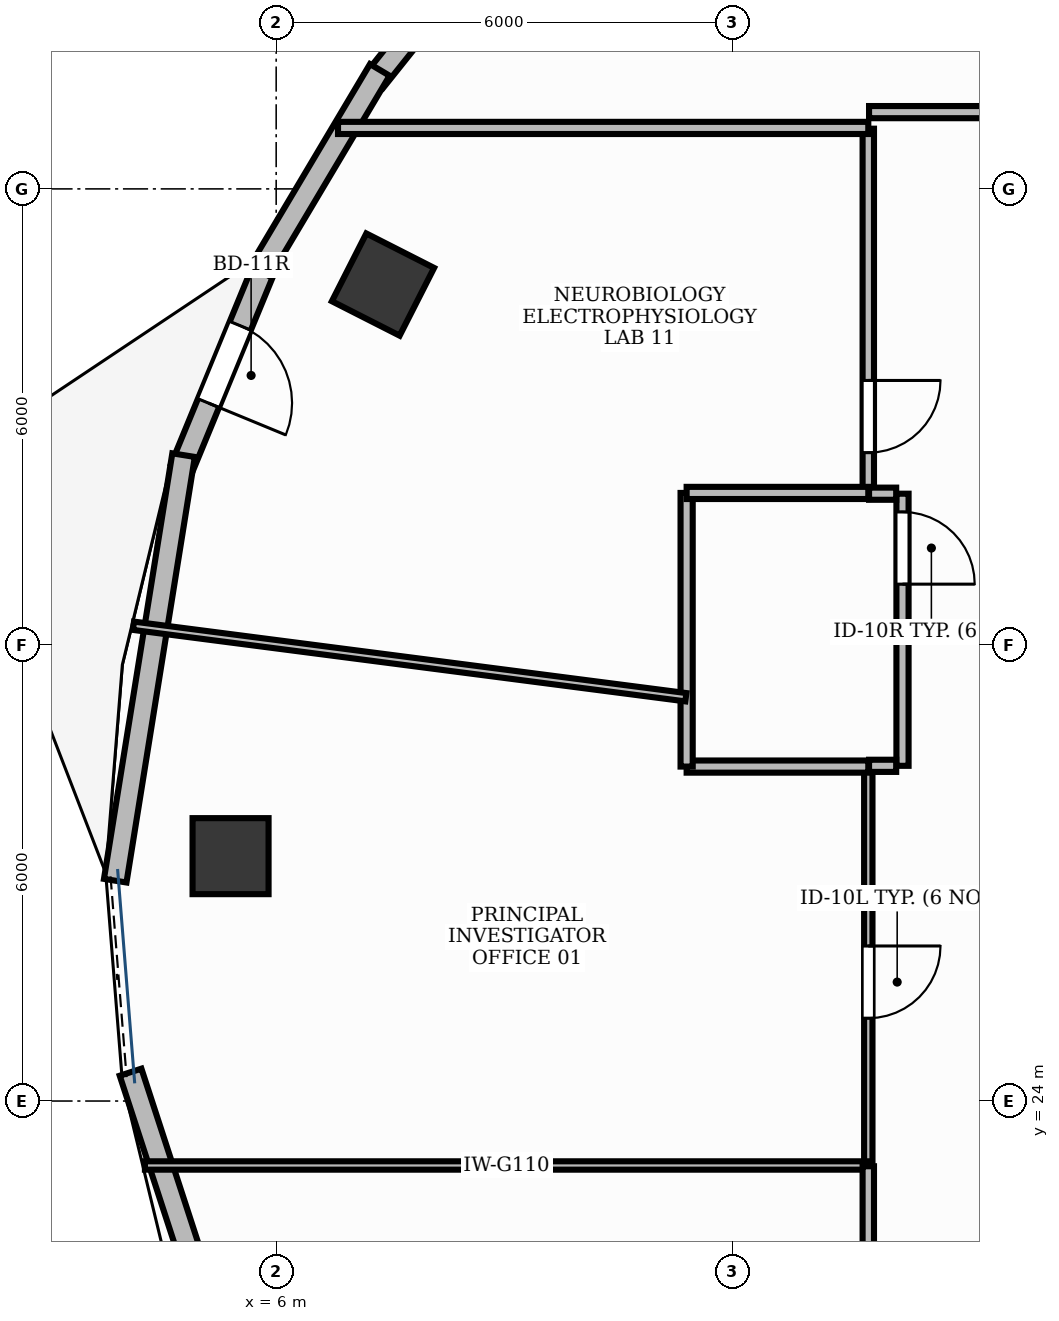
"""IFC4 building model, lengths in metres.
Left out: names, types, materials, properties, quantities, classifications, styles, units other than length and angle.
Written with IfcOpenShell. Run it as: python <this file> out.ifc"""

import sys

from ifc_helpers import new_model, si_unit, direction, frame, frame_2d, origin, origin_2d, place, context, subcontext, project, spatial, rectangle, extrude, element, fill, save


model = new_model("IFC4")
c1 = context("Model", 3, precision=1e-05, world=origin(), true_north=direction((0.0, 1.0)))
c2 = subcontext(c1, "Body", "Model", "MODEL_VIEW")
j1 = project(units=[si_unit("LENGTHUNIT", "METRE"), si_unit("PLANEANGLEUNIT", "RADIAN")], contexts=[c1])
p1 = place(None, origin())
s1 = spatial("IfcSite", under=j1, at=p1, CompositionType="ELEMENT")
p2 = place(p1, origin())
s2 = spatial("IfcBuilding", under=s1, at=p2, CompositionType="ELEMENT")
p3 = place(p2, frame((0.0, 0.0, 222.6)))
s3 = spatial("IfcBuildingStorey", under=s2, at=p3, CompositionType="ELEMENT", Elevation=222.6)
for number, where, z_axis, x_axis in (
    (1, (7.405, 34.741, -0.0), (0.0, 0.0, 1.0), (0.453, 0.891, 0.0)),
    (2, (5.4, 27.222, -0.0), (0.0, 0.0, 1.0), (0.0, 1.0, 0.0)),
):
    element("IfcColumn", number, at=place(p3, frame(where, z_axis=z_axis, x_axis=x_axis)), inside=s3, PredefinedType="COLUMN", context=c2, shape_type="SweptSolid", body=[
        extrude(rectangle(XDim=1.0, YDim=1.0, at=origin_2d()), origin(), (0.0, 0.0, 1.0), 3.901),
    ])
p4 = place(p3, frame((9.244, 39.868, 0.0), z_axis=(0.0, 0.0, 1.0), x_axis=(-0.624095877763, -0.781347768512, 0.0)))
e3 = element("IfcWall", 3, at=p4, inside=s3, PredefinedType="STANDARD", context=c2, shape_type="SweptSolid", body=[
    extrude(rectangle(XDim=3.132, YDim=0.3, at=frame_2d((1.566, 0.0))), origin(), (0.0, 0.0, 1.0), 3.9),
])
p5 = place(p4, frame((0.816, 0.0, 0.95)))
e4 = element("IfcOpeningElement", 4, at=p5, cuts=e3, PredefinedType="OPENING", context=c2, shape_type="SweptSolid", body=[
    extrude(rectangle(XDim=1.5, YDim=1.8, at=frame_2d((0.75, 0.9))), frame((0.0, 0.165, 0.0), z_axis=(0.0, -1.0, 0.0), x_axis=(1.0, 0.0, 0.0)), (0.0, 0.0, 1.0), 0.33),
])
p6 = place(p3, frame((5.882, 35.057, 0.0), z_axis=(0.0, 0.0, 1.0), x_axis=(-0.381011504275, -0.924570296738, 0.0)))
e5 = element("IfcWall", 5, at=p6, inside=s3, PredefinedType="STANDARD", context=c2, shape_type="SweptSolid", body=[
    extrude(rectangle(XDim=2.956, YDim=0.3, at=frame_2d((1.478, 0.0))), origin(), (0.0, 0.0, 1.0), 3.9),
])
p7 = place(p6, frame((0.928, 0.0, 0.0)))
e6 = element("IfcOpeningElement", 6, at=p7, cuts=e5, PredefinedType="OPENING", context=c2, shape_type="SweptSolid", body=[
    extrude(rectangle(XDim=1.1, YDim=2.15, at=frame_2d((0.55, 1.075))), frame((0.0, 0.165, 0.0), z_axis=(0.0, -1.0, 0.0), x_axis=(1.0, 0.0, 0.0)), (0.0, 0.0, 1.0), 0.33),
])
p8 = place(p3, frame((7.363, 37.565, 0.0), z_axis=(0.0, 0.0, 1.0), x_axis=(-0.511305212285, -0.85939919705, 0.0)))
e7 = element("IfcWall", 7, at=p8, inside=s3, PredefinedType="STANDARD", context=c2, shape_type="SweptSolid", body=[
    extrude(rectangle(XDim=3.075, YDim=0.3, at=frame_2d((1.538, 0.0))), origin(), (0.0, 0.0, 1.0), 3.9),
])
p9 = place(p3, frame((4.782, 32.497, 0.0), z_axis=(0.0, 0.0, 1.0), x_axis=(-0.158573166105, -0.987347229191, 0.0)))
e8 = element("IfcWall", 8, at=p9, inside=s3, PredefinedType="STANDARD", context=c2, shape_type="SweptSolid", body=[
    extrude(rectangle(XDim=5.67, YDim=0.3, at=frame_2d((2.835, 0.0))), origin(), (0.0, 0.0, 1.0), 3.9),
])
p10 = place(p3, frame((4.084, 24.379, 0.0), z_axis=(0.0, 0.0, 1.0), x_axis=(0.309937285623, -0.95075700312, 0.0)))
e9 = element("IfcWall", 9, at=p10, inside=s3, PredefinedType="STANDARD", context=c2, shape_type="SweptSolid", body=[
    extrude(rectangle(XDim=5.758, YDim=0.3, at=frame_2d((2.879, 0.0))), origin(), (0.0, 0.0, 1.0), 3.47),
])
p11 = place(p3, frame((14.24, 31.99, 0.0), z_axis=(0.0, 0.0, 1.0), x_axis=(0.0, -1.0, 0.0)))
e10 = element("IfcWall", 10, at=p11, inside=s3, PredefinedType="PARTITIONING", context=c2, shape_type="SweptSolid", body=[
    extrude(rectangle(XDim=3.58, YDim=0.16, at=frame_2d((1.79, 0.0))), origin(), (0.0, 0.0, 1.0), 2.91),
])
p12 = place(p11, frame((0.24, 0.0, 0.0)))
e11 = element("IfcOpeningElement", 11, at=p12, cuts=e10, PredefinedType="OPENING", context=c2, shape_type="SweptSolid", body=[
    extrude(rectangle(XDim=0.95, YDim=2.15, at=frame_2d((0.475, 1.075))), frame((0.0, 0.095, 0.0), z_axis=(0.0, -1.0, 0.0), x_axis=(1.0, 0.0, 0.0)), (0.0, 0.0, 1.0), 0.19),
])
p13 = place(p3, frame((13.79, 28.39, 0.0), z_axis=(0.0, 0.0, 1.0), x_axis=(0.0, -1.0, 0.0)))
e12 = element("IfcWall", 12, at=p13, inside=s3, PredefinedType="MOVABLE", context=c2, shape_type="SweptSolid", body=[
    extrude(rectangle(XDim=5.238, YDim=0.11, at=frame_2d((2.619, 0.0))), origin(), (0.0, 0.0, 1.0), 2.91),
])
p14 = place(p13, frame((2.35, 0.0, 0.0)))
e13 = element("IfcOpeningElement", 13, at=p14, cuts=e12, PredefinedType="OPENING", context=c2, shape_type="SweptSolid", body=[
    extrude(rectangle(XDim=0.95, YDim=2.15, at=frame_2d((0.475, 1.075))), frame((0.0, 0.07, 0.0), z_axis=(0.0, -1.0, 0.0), x_axis=(1.0, 0.0, 0.0)), (0.0, 0.0, 1.0), 0.14),
])
p15 = place(p3, frame((13.79, 36.792, 0.0), z_axis=(0.0, 0.0, 1.0), x_axis=(0.0, -1.0, 0.0)))
e14 = element("IfcWall", 14, at=p15, inside=s3, PredefinedType="PARTITIONING", context=c2, shape_type="SweptSolid", body=[
    extrude(rectangle(XDim=4.782, YDim=0.15, at=frame_2d((2.391, 0.0))), origin(), (0.0, 0.0, 1.0), 2.91),
])
p16 = place(p15, frame((3.312, 0.0, 0.0)))
e15 = element("IfcOpeningElement", 15, at=p16, cuts=e14, PredefinedType="OPENING", context=c2, shape_type="SweptSolid", body=[
    extrude(rectangle(XDim=0.95, YDim=2.15, at=frame_2d((0.475, 1.075))), frame((0.0, 0.09, 0.0), z_axis=(0.0, -1.0, 0.0), x_axis=(1.0, 0.0, 0.0)), (0.0, 0.0, 1.0), 0.18),
])
for number, where, z_axis, x_axis in (
    (16, (13.8, 31.99, 0.0), (0.0, 0.0, 1.0), (1.0, 0.0, 0.0)),
    (17, (14.157, 28.41, 0.0), (0.0, 0.0, 1.0), (-1.0, 0.0, 0.0)),
):
    element("IfcWall", number, at=place(p3, frame(where, z_axis=z_axis, x_axis=x_axis)), inside=s3, PredefinedType="PARTITIONING", context=c2, shape_type="SweptSolid", body=[
        extrude(rectangle(XDim=0.357, YDim=0.16, at=frame_2d((0.178, 0.0))), origin(), (0.0, 0.0, 1.0), 2.91),
    ])
p17 = place(p3, frame((13.79, 28.4, 0.0), z_axis=(0.0, 0.0, 1.0), x_axis=(-1.0, 0.0, 0.0)))
e18 = element("IfcWall", 18, at=p17, inside=s3, PredefinedType="PARTITIONING", context=c2, shape_type="SweptSolid", body=[
    extrude(rectangle(XDim=2.39, YDim=0.16, at=frame_2d((1.195, 0.0))), origin(), (0.0, 0.0, 1.0), 2.91),
])
p18 = place(p3, frame((11.4, 28.4, 0.0), z_axis=(0.0, 0.0, 1.0), x_axis=(0.0, 1.0, 0.0)))
e19 = element("IfcWall", 19, at=p18, inside=s3, PredefinedType="PARTITIONING", context=c2, shape_type="SweptSolid", body=[
    extrude(rectangle(XDim=3.6, YDim=0.16, at=frame_2d((1.8, 0.0))), origin(), (0.0, 0.0, 1.0), 2.91),
])
p19 = place(p3, frame((11.4, 32.0, 0.0), z_axis=(0.0, 0.0, 1.0), x_axis=(1.0, 0.0, 0.0)))
e20 = element("IfcWall", 20, at=p19, inside=s3, PredefinedType="PARTITIONING", context=c2, shape_type="SweptSolid", body=[
    extrude(rectangle(XDim=2.39, YDim=0.16, at=frame_2d((1.195, 0.0))), origin(), (0.0, 0.0, 1.0), 2.91),
])
p20 = place(p3, frame((4.123, 30.253, 0.0), z_axis=(0.0, 0.0, 1.0), x_axis=(0.991734568624, -0.128306451111, 0.0)))
e21 = element("IfcWall", 21, at=p20, inside=s3, PredefinedType="MOVABLE", context=c2, shape_type="SweptSolid", body=[
    extrude(rectangle(XDim=7.328, YDim=0.11, at=frame_2d((3.664, 0.0))), origin(), (0.0, 0.0, 1.0), 2.91),
])
p21 = place(p3, frame((13.79, 23.152, 0.0), z_axis=(0.0, 0.0, 1.0), x_axis=(-1.0, 0.0, 0.0)))
e22 = element("IfcWall", 22, at=p21, inside=s3, PredefinedType="MOVABLE", context=c2, shape_type="SweptSolid", body=[
    extrude(rectangle(XDim=9.517, YDim=0.11, at=frame_2d((4.758, 0.0))), origin(), (0.0, 0.0, 1.0), 2.91),
])
p22 = place(p3, frame((13.79, 23.142, 0.0), z_axis=(0.0, 0.0, 1.0), x_axis=(0.0, -1.0, 0.0)))
e23 = element("IfcWall", 23, at=p22, inside=s3, PredefinedType="PARTITIONING", context=c2, shape_type="SweptSolid", body=[
    extrude(rectangle(XDim=10.046, YDim=0.15, at=frame_2d((5.023, 0.0))), origin(), (0.0, 0.0, 1.0), 2.91),
])
p23 = place(p3, frame((17.6, 37.01, 0.0), z_axis=(0.0, 0.0, 1.0), x_axis=(-1.0, 0.0, 0.0)))
e24 = element("IfcWall", 24, at=p23, inside=s3, PredefinedType="PARTITIONING", context=c2, shape_type="SweptSolid", body=[
    extrude(rectangle(XDim=3.8, YDim=0.16, at=frame_2d((1.9, 0.0))), origin(), (0.0, 0.0, 1.0), 2.91),
])
p24 = place(p3, frame((13.79, 36.802, 0.0), z_axis=(0.0, 0.0, 1.0), x_axis=(-1.0, 0.0, 0.0)))
e25 = element("IfcWall", 25, at=p24, inside=s3, PredefinedType="PARTITIONING", context=c2, shape_type="SweptSolid", body=[
    extrude(rectangle(XDim=6.976, YDim=0.16, at=frame_2d((3.488, 0.0))), origin(), (0.0, 0.0, 1.0), 2.91),
])
p25 = place(p7, origin())
e26 = element("IfcDoor", 26, at=p25, inside=s3, OperationType="SINGLE_SWING_RIGHT", PredefinedType="DOOR", context=c2, shape_type="SweptSolid", body=[
    extrude(rectangle(XDim=1.1, YDim=2.15, at=frame_2d((0.55, 1.075))), frame((0.0, 0.025, 0.0), z_axis=(0.0, -1.0, 0.0), x_axis=(1.0, 0.0, 0.0)), (0.0, 0.0, 1.0), 0.05),
])
fill(e6, e26)
p26 = place(p12, origin())
e27 = element("IfcDoor", 27, at=p26, inside=s3, OperationType="SINGLE_SWING_RIGHT", PredefinedType="DOOR", context=c2, shape_type="SweptSolid", body=[
    extrude(rectangle(XDim=0.95, YDim=2.15, at=frame_2d((0.475, 1.075))), frame((0.0, 0.025, 0.0), z_axis=(0.0, -1.0, 0.0), x_axis=(1.0, 0.0, 0.0)), (0.0, 0.0, 1.0), 0.05),
])
fill(e11, e27)
p27 = place(p14, origin())
e28 = element("IfcDoor", 28, at=p27, inside=s3, OperationType="SINGLE_SWING_LEFT", PredefinedType="DOOR", context=c2, shape_type="SweptSolid", body=[
    extrude(rectangle(XDim=0.95, YDim=2.15, at=frame_2d((0.475, 1.075))), frame((0.0, 0.025, 0.0), z_axis=(0.0, -1.0, 0.0), x_axis=(1.0, 0.0, 0.0)), (0.0, 0.0, 1.0), 0.05),
])
fill(e13, e28)
p28 = place(p16, origin())
e29 = element("IfcDoor", 29, at=p28, inside=s3, OperationType="SINGLE_SWING_LEFT", PredefinedType="DOOR", context=c2, shape_type="SweptSolid", body=[
    extrude(rectangle(XDim=0.95, YDim=2.15, at=frame_2d((0.475, 1.075))), frame((0.0, 0.025, 0.0), z_axis=(0.0, -1.0, 0.0), x_axis=(1.0, 0.0, 0.0)), (0.0, 0.0, 1.0), 0.05),
])
fill(e15, e29)
save(model, sys.argv[1])
